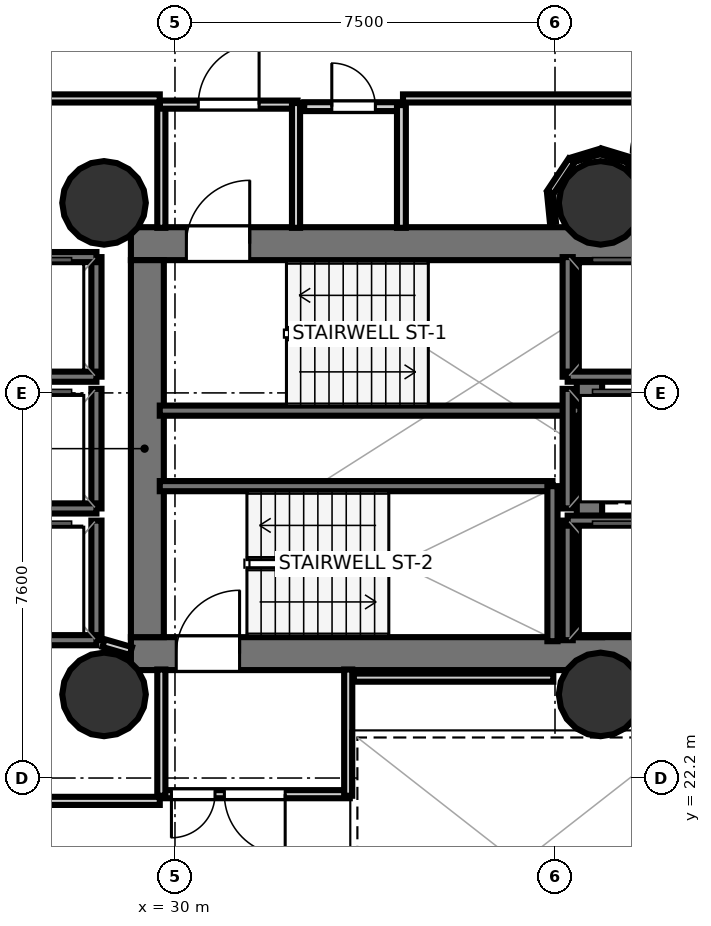
"""IFC4 building model, lengths in metres.
Left out: names, types, materials, properties, quantities, classifications, styles, units other than length and angle.
Written with IfcOpenShell. Run it as: python <this file> out.ifc"""

import sys

from ifc_helpers import new_model, si_unit, direction, frame, frame_2d, origin, origin_2d, place, context, subcontext, project, spatial, rectangle, hollow_circle, extrude, element, fill, save


model = new_model("IFC4")
c1 = context("Model", 3, precision=1e-05, world=origin(), true_north=direction((0.0, 1.0)))
c2 = subcontext(c1, "Body", "Model", "MODEL_VIEW")
j1 = project(units=[si_unit("LENGTHUNIT", "METRE"), si_unit("PLANEANGLEUNIT", "RADIAN")], contexts=[c1])
p1 = place(None, origin())
s1 = spatial("IfcSite", under=j1, at=p1, CompositionType="ELEMENT")
p2 = place(p1, origin())
s2 = spatial("IfcBuilding", under=s1, at=p2, CompositionType="ELEMENT")
p3 = place(p2, frame((0.0, 0.0, 82.1)))
s3 = spatial("IfcBuildingStorey", under=s2, at=p3, CompositionType="ELEMENT", Elevation=82.1)
p4 = place(p3, frame((29.13, 32.745, 0.0), z_axis=(0.0, 0.0, 1.0), x_axis=(1.0, 0.0, 0.0)))
e1 = element("IfcWall", 1, at=p4, inside=s3, PredefinedType="SHEAR", context=c2, shape_type="SweptSolid", body=[
    extrude(rectangle(XDim=10.72, YDim=0.65, at=frame_2d((5.36, 0.0))), origin(), (0.0, 0.0, 1.0), 3.52),
])
p5 = place(p4, frame((1.095, 0.0, 0.0)))
e2 = element("IfcOpeningElement", 2, at=p5, cuts=e1, PredefinedType="OPENING", context=c2, shape_type="SweptSolid", body=[
    extrude(rectangle(XDim=1.25, YDim=2.15, at=frame_2d((0.625, 1.075))), frame((0.0, 0.335, 0.0), z_axis=(0.0, -1.0, 0.0), x_axis=(1.0, 0.0, 0.0)), (0.0, 0.0, 1.0), 0.67),
])
p6 = place(p3, frame((29.13, 24.655, 0.0), z_axis=(0.0, 0.0, 1.0), x_axis=(1.0, 0.0, 0.0)))
e3 = element("IfcWall", 3, at=p6, inside=s3, PredefinedType="SHEAR", context=c2, shape_type="SweptSolid", body=[
    extrude(rectangle(XDim=10.72, YDim=0.65, at=frame_2d((5.36, 0.0))), origin(), (0.0, 0.0, 1.0), 3.52),
])
p7 = place(p6, frame((0.895, 0.0, 0.0)))
e4 = element("IfcOpeningElement", 4, at=p7, cuts=e3, PredefinedType="OPENING", context=c2, shape_type="SweptSolid", body=[
    extrude(rectangle(XDim=1.25, YDim=2.15, at=frame_2d((0.625, 1.075))), frame((0.0, 0.335, 0.0), z_axis=(0.0, -1.0, 0.0), x_axis=(1.0, 0.0, 0.0)), (0.0, 0.0, 1.0), 0.67),
])
p8 = place(p3, frame((29.455, 24.98, 0.0), z_axis=(0.0, 0.0, 1.0), x_axis=(0.0, 1.0, 0.0)))
e5 = element("IfcWall", 5, at=p8, inside=s3, PredefinedType="SHEAR", context=c2, shape_type="SweptSolid", body=[
    extrude(rectangle(XDim=7.44, YDim=0.65, at=frame_2d((3.72, 0.0))), origin(), (0.0, 0.0, 1.0), 3.52),
])
p9 = place(p3, frame((38.18, 24.98, 0.0), z_axis=(0.0, 0.0, 1.0), x_axis=(0.0, 1.0, 0.0)))
e6 = element("IfcWall", 6, at=p9, inside=s3, PredefinedType="SHEAR", context=c2, shape_type="SweptSolid", body=[
    extrude(rectangle(XDim=7.44, YDim=0.5, at=frame_2d((3.72, 0.0))), origin(), (0.0, 0.0, 1.0), 3.52),
])
for number, where, z_axis, x_axis in (
    (7, (28.6, 33.55, 0.0), (0.0, 0.0, 1.0), (1.0, 0.0, 0.0)),
    (8, (28.6, 23.85, 0.0), (0.0, 0.0, 1.0), (1.0, 0.0, 0.0)),
    (9, (38.4, 33.55, 0.0), (0.0, 0.0, 1.0), (1.0, 0.0, 0.0)),
    (10, (38.4, 23.85, 0.0), (0.0, 0.0, 1.0), (1.0, 0.0, 0.0)),
):
    element("IfcColumn", number, at=place(p3, frame(where, z_axis=z_axis, x_axis=x_axis)), inside=s3, PredefinedType="COLUMN", context=c2, shape_type="SweptSolid", body=[
        extrude(hollow_circle(Radius=0.825, WallThickness=0.04, at=origin_2d()), origin(), (0.0, 0.0, 1.0), 3.7),
    ])
p10 = place(p3, frame((29.7, 29.45, 0.0), z_axis=(0.0, 0.0, 1.0), x_axis=(1.0, 0.0, 0.0)))
e11 = element("IfcWall", 11, at=p10, inside=s3, PredefinedType="SOLIDWALL", context=c2, shape_type="SweptSolid", body=[
    extrude(rectangle(XDim=8.3, YDim=0.2, at=frame_2d((4.15, 0.0))), origin(), (0.0, 0.0, 1.0), 3.52),
])
p11 = place(p3, frame((29.7, 27.96, 0.0), z_axis=(0.0, 0.0, 1.0), x_axis=(1.0, 0.0, 0.0)))
e12 = element("IfcWall", 12, at=p11, inside=s3, PredefinedType="SOLIDWALL", context=c2, shape_type="SweptSolid", body=[
    extrude(rectangle(XDim=7.75, YDim=0.2, at=frame_2d((3.875, 0.0))), origin(), (0.0, 0.0, 1.0), 3.52),
])
p12 = place(p3, frame((37.45, 24.9, 0.0), z_axis=(0.0, 0.0, 1.0), x_axis=(0.0, 1.0, 0.0)))
e13 = element("IfcWall", 13, at=p12, inside=s3, PredefinedType="SOLIDWALL", context=c2, shape_type="SweptSolid", body=[
    extrude(rectangle(XDim=3.06, YDim=0.2, at=frame_2d((1.53, 0.0))), origin(), (0.0, 0.0, 1.0), 3.52),
])
p13 = place(p3, frame((37.75, 30.12, 0.0), z_axis=(0.0, 0.0, 1.0), x_axis=(0.0, 1.0, 0.0)))
e14 = element("IfcWall", 14, at=p13, inside=s3, PredefinedType="SOLIDWALL", context=c2, shape_type="SweptSolid", body=[
    extrude(rectangle(XDim=2.36, YDim=0.2, at=frame_2d((1.18, 0.0))), origin(), (0.0, 0.0, 1.0), 3.52),
])
p14 = place(p3, frame((37.75, 30.12, 0.0), z_axis=(0.0, 0.0, 1.0), x_axis=(1.0, 0.0, 0.0)))
e15 = element("IfcWall", 15, at=p14, inside=s3, PredefinedType="SOLIDWALL", context=c2, shape_type="SweptSolid", body=[
    extrude(rectangle(XDim=2.1, YDim=0.2, at=frame_2d((1.05, 0.0))), origin(), (0.0, 0.0, 1.0), 3.52),
])
p15 = place(p3, frame((37.75, 24.92, 0.0), z_axis=(0.0, 0.0, 1.0), x_axis=(0.0, 1.0, 0.0)))
e16 = element("IfcWall", 16, at=p15, inside=s3, PredefinedType="SOLIDWALL", context=c2, shape_type="SweptSolid", body=[
    extrude(rectangle(XDim=2.36, YDim=0.2, at=frame_2d((1.18, 0.0))), origin(), (0.0, 0.0, 1.0), 3.52),
])
p16 = place(p3, frame((37.75, 27.28, 0.0), z_axis=(0.0, 0.0, 1.0), x_axis=(1.0, 0.0, 0.0)))
e17 = element("IfcWall", 17, at=p16, inside=s3, PredefinedType="SOLIDWALL", context=c2, shape_type="SweptSolid", body=[
    extrude(rectangle(XDim=2.1, YDim=0.2, at=frame_2d((1.05, 0.0))), origin(), (0.0, 0.0, 1.0), 3.52),
])
p17 = place(p3, frame((28.45, 30.12, 0.0), z_axis=(0.0, 0.0, 1.0), x_axis=(0.0, 1.0, 0.0)))
e18 = element("IfcWall", 18, at=p17, inside=s3, PredefinedType="SOLIDWALL", context=c2, shape_type="SweptSolid", body=[
    extrude(rectangle(XDim=2.36, YDim=0.2, at=frame_2d((1.18, 0.0))), origin(), (0.0, 0.0, 1.0), 3.52),
])
for number, where, z_axis, x_axis in (
    (19, (26.35, 32.48, 0.0), (0.0, 0.0, 1.0), (1.0, 0.0, 0.0)),
    (20, (26.35, 30.12, 0.0), (0.0, 0.0, 1.0), (1.0, 0.0, 0.0)),
):
    element("IfcWall", number, at=place(p3, frame(where, z_axis=z_axis, x_axis=x_axis)), inside=s3, PredefinedType="SOLIDWALL", context=c2, shape_type="SweptSolid", body=[
        extrude(rectangle(XDim=2.1, YDim=0.2, at=frame_2d((1.05, 0.0))), origin(), (0.0, 0.0, 1.0), 3.52),
    ])
p18 = place(p3, frame((28.45, 27.52, 0.0), z_axis=(0.0, 0.0, 1.0), x_axis=(0.0, 1.0, 0.0)))
e21 = element("IfcWall", 21, at=p18, inside=s3, PredefinedType="SOLIDWALL", context=c2, shape_type="SweptSolid", body=[
    extrude(rectangle(XDim=2.36, YDim=0.2, at=frame_2d((1.18, 0.0))), origin(), (0.0, 0.0, 1.0), 3.52),
])
p19 = place(p3, frame((26.35, 27.52, 0.0), z_axis=(0.0, 0.0, 1.0), x_axis=(1.0, 0.0, 0.0)))
e22 = element("IfcWall", 22, at=p19, inside=s3, PredefinedType="SOLIDWALL", context=c2, shape_type="SweptSolid", body=[
    extrude(rectangle(XDim=2.1, YDim=0.2, at=frame_2d((1.05, 0.0))), origin(), (0.0, 0.0, 1.0), 3.52),
])
p20 = place(p3, frame((28.45, 24.92, 0.0), z_axis=(0.0, 0.0, 1.0), x_axis=(0.0, 1.0, 0.0)))
e23 = element("IfcWall", 23, at=p20, inside=s3, PredefinedType="SOLIDWALL", context=c2, shape_type="SweptSolid", body=[
    extrude(rectangle(XDim=2.36, YDim=0.2, at=frame_2d((1.18, 0.0))), origin(), (0.0, 0.0, 1.0), 3.52),
])
p21 = place(p3, frame((26.35, 24.92, 0.0), z_axis=(0.0, 0.0, 1.0), x_axis=(1.0, 0.0, 0.0)))
e24 = element("IfcWall", 24, at=p21, inside=s3, PredefinedType="SOLIDWALL", context=c2, shape_type="SweptSolid", body=[
    extrude(rectangle(XDim=2.1, YDim=0.2, at=frame_2d((1.05, 0.0))), origin(), (0.0, 0.0, 1.0), 3.52),
])
p22 = place(p3, frame((37.75, 27.52, 0.0), z_axis=(0.0, 0.0, 1.0), x_axis=(0.0, 1.0, 0.0)))
e25 = element("IfcWall", 25, at=p22, inside=s3, PredefinedType="SOLIDWALL", context=c2, shape_type="SweptSolid", body=[
    extrude(rectangle(XDim=2.36, YDim=0.2, at=frame_2d((1.18, 0.0))), origin(), (0.0, 0.0, 1.0), 3.52),
])
p23 = place(p3, frame((29.731, 33.058, 0.0), z_axis=(0.0, 0.0, 1.0), x_axis=(0.0, 1.0, 0.0)))
e26 = element("IfcWall", 26, at=p23, inside=s3, PredefinedType="PARTITIONING", context=c2, shape_type="SweptSolid", body=[
    extrude(rectangle(XDim=2.462, YDim=0.16, at=frame_2d((1.231, 0.0))), origin(), (0.0, 0.0, 1.0), 2.84),
])
p24 = place(p3, frame((29.7, 35.489, 0.0), z_axis=(0.0, 0.0, 1.0), x_axis=(1.0, 0.0, 0.0)))
e27 = element("IfcWall", 27, at=p24, inside=s3, PredefinedType="PARTITIONING", context=c2, shape_type="SweptSolid", body=[
    extrude(rectangle(XDim=2.72, YDim=0.16, at=frame_2d((1.36, 0.0))), origin(), (0.0, 0.0, 1.0), 2.84),
])
p25 = place(p24, frame((0.76, 0.0, 0.0)))
e28 = element("IfcOpeningElement", 28, at=p25, cuts=e27, PredefinedType="OPENING", context=c2, shape_type="SweptSolid", body=[
    extrude(rectangle(XDim=1.2, YDim=2.15, at=frame_2d((0.6, 1.075))), frame((0.0, 0.09, 0.0), z_axis=(0.0, -1.0, 0.0), x_axis=(1.0, 0.0, 0.0)), (0.0, 0.0, 1.0), 0.18),
])
p26 = place(p3, frame((32.389, 35.52, 0.0), z_axis=(0.0, 0.0, 1.0), x_axis=(0.0, -1.0, 0.0)))
e29 = element("IfcWall", 29, at=p26, inside=s3, PredefinedType="PARTITIONING", context=c2, shape_type="SweptSolid", body=[
    extrude(rectangle(XDim=2.462, YDim=0.16, at=frame_2d((1.231, 0.0))), origin(), (0.0, 0.0, 1.0), 2.84),
])
p27 = place(p3, frame((33.45, 21.881, 0.0), z_axis=(0.0, 0.0, 1.0), x_axis=(-1.0, 0.0, 0.0)))
e30 = element("IfcWall", 30, at=p27, inside=s3, PredefinedType="PARTITIONING", context=c2, shape_type="SweptSolid", body=[
    extrude(rectangle(XDim=3.75, YDim=0.16, at=frame_2d((1.875, 0.0))), origin(), (0.0, 0.0, 1.0), 2.84),
])
p28 = place(p27, frame((1.275, 0.0, 0.0)))
e31 = element("IfcOpeningElement", 31, at=p28, cuts=e30, PredefinedType="OPENING", context=c2, shape_type="SweptSolid", body=[
    extrude(rectangle(XDim=1.2, YDim=2.15, at=frame_2d((0.6, 1.075))), frame((0.0, 0.09, 0.0), z_axis=(0.0, -1.0, 0.0), x_axis=(1.0, 0.0, 0.0)), (0.0, 0.0, 1.0), 0.18),
])
p29 = place(p27, frame((2.66, 0.0, 0.0)))
e32 = element("IfcOpeningElement", 32, at=p29, cuts=e30, PredefinedType="OPENING", context=c2, shape_type="SweptSolid", body=[
    extrude(rectangle(XDim=0.86, YDim=2.05, at=frame_2d((0.43, 1.025))), frame((0.0, 0.09, 0.0), z_axis=(0.0, -1.0, 0.0), x_axis=(1.0, 0.0, 0.0)), (0.0, 0.0, 1.0), 0.18),
])
for number, where, z_axis, x_axis in (
    (33, (29.731, 21.85, 0.0), (0.0, 0.0, 1.0), (0.0, 1.0, 0.0)),
    (34, (33.419, 24.342, 0.0), (0.0, 0.0, 1.0), (0.0, -1.0, 0.0)),
):
    element("IfcWall", number, at=place(p3, frame(where, z_axis=z_axis, x_axis=x_axis)), inside=s3, PredefinedType="PARTITIONING", context=c2, shape_type="SweptSolid", body=[
        extrude(rectangle(XDim=2.492, YDim=0.16, at=frame_2d((1.246, 0.0))), origin(), (0.0, 0.0, 1.0), 2.84),
    ])
p30 = place(p3, frame((32.55, 35.449, 0.0), z_axis=(0.0, 0.0, 1.0), x_axis=(1.0, 0.0, 0.0)))
e35 = element("IfcWall", 35, at=p30, inside=s3, PredefinedType="PLUMBINGWALL", context=c2, shape_type="SweptSolid", body=[
    extrude(rectangle(XDim=1.95, YDim=0.175, at=frame_2d((0.975, 0.0))), origin(), (0.0, 0.0, 1.0), 2.84),
])
p31 = place(p30, frame((0.545, 0.0, 0.0)))
e36 = element("IfcOpeningElement", 36, at=p31, cuts=e35, PredefinedType="OPENING", context=c2, shape_type="SweptSolid", body=[
    extrude(rectangle(XDim=0.86, YDim=2.05, at=frame_2d((0.43, 1.025))), frame((0.0, 0.097, 0.0), z_axis=(0.0, -1.0, 0.0), x_axis=(1.0, 0.0, 0.0)), (0.0, 0.0, 1.0), 0.195),
])
p32 = place(p3, frame((34.469, 35.48, 0.0), z_axis=(0.0, 0.0, 1.0), x_axis=(0.0, -1.0, 0.0)))
e37 = element("IfcWall", 37, at=p32, inside=s3, PredefinedType="PLUMBINGWALL", context=c2, shape_type="SweptSolid", body=[
    extrude(rectangle(XDim=2.422, YDim=0.175, at=frame_2d((1.211, 0.0))), origin(), (0.0, 0.0, 1.0), 2.84),
])
p33 = place(p3, frame((29.13, 24.706, 0.0), z_axis=(0.0, 0.0, 1.0), x_axis=(-0.960451214223, 0.278448316742, 0.0)))
e38 = element("IfcWall", 38, at=p33, inside=s3, PredefinedType="PARTITIONING", context=c2, shape_type="SweptSolid", body=[
    extrude(rectangle(XDim=0.562, YDim=0.16, at=frame_2d((0.281, 0.0))), origin(), (0.0, 0.0, 1.0), 2.84),
])
p34 = place(p3, frame((37.467, 24.181, 0.0), z_axis=(0.0, 0.0, 1.0), x_axis=(-1.0, 0.0, 0.0)))
e39 = element("IfcWall", 39, at=p34, inside=s3, PredefinedType="PARTITIONING", context=c2, shape_type="SweptSolid", body=[
    extrude(rectangle(XDim=3.937, YDim=0.16, at=frame_2d((1.968, 0.0))), origin(), (0.0, 0.0, 1.0), 2.84),
])
p35 = place(p3, frame((39.818, 35.611, 0.0), z_axis=(0.0, 0.0, 1.0), x_axis=(-1.0, 0.0, 0.0)))
e40 = element("IfcWall", 40, at=p35, inside=s3, PredefinedType="PARTITIONING", context=c2, shape_type="SweptSolid", body=[
    extrude(rectangle(XDim=5.318, YDim=0.16, at=frame_2d((2.659, 0.0))), origin(), (0.0, 0.0, 1.0), 2.84),
])
p36 = place(p3, frame((29.7, 35.611, 0.0), z_axis=(0.0, 0.0, 1.0), x_axis=(-1.0, 0.0, 0.0)))
e41 = element("IfcWall", 41, at=p36, inside=s3, PredefinedType="PARTITIONING", context=c2, shape_type="SweptSolid", body=[
    extrude(rectangle(XDim=3.28, YDim=0.16, at=frame_2d((1.64, 0.0))), origin(), (0.0, 0.0, 1.0), 2.798),
])
p37 = place(p3, frame((26.42, 21.749, 0.0), z_axis=(0.0, 0.0, 1.0), x_axis=(1.0, 0.0, 0.0)))
e42 = element("IfcWall", 42, at=p37, inside=s3, PredefinedType="PARTITIONING", context=c2, shape_type="SweptSolid", body=[
    extrude(rectangle(XDim=3.28, YDim=0.16, at=frame_2d((1.64, 0.0))), origin(), (0.0, 0.0, 1.0), 2.84),
])
p38 = place(p3, frame((39.392, 33.76, 0.0), z_axis=(0.0, 0.0, 1.0), x_axis=(-0.555746078923, 0.831352088926, 0.0)))
e43 = element("IfcWall", 43, at=p38, inside=s3, PredefinedType="PARTITIONING", context=c2, shape_type="SweptSolid", body=[
    extrude(rectangle(XDim=0.754, YDim=0.14, at=frame_2d((0.377, 0.0))), origin(), (0.0, 0.0, 1.0), 2.84),
])
p39 = place(p3, frame((38.956, 34.399, 0.0), z_axis=(0.0, 0.0, 1.0), x_axis=(-0.956952578659, 0.290244314669, 0.0)))
e44 = element("IfcWall", 44, at=p39, inside=s3, PredefinedType="PARTITIONING", context=c2, shape_type="SweptSolid", body=[
    extrude(rectangle(XDim=0.572, YDim=0.12, at=frame_2d((0.286, 0.0))), origin(), (0.0, 0.0, 1.0), 2.84),
])
p40 = place(p3, frame((38.391, 34.565, 0.0), z_axis=(0.0, 0.0, 1.0), x_axis=(-0.956952578659, -0.290244314669, 0.0)))
e45 = element("IfcWall", 45, at=p40, inside=s3, PredefinedType="PARTITIONING", context=c2, shape_type="SweptSolid", body=[
    extrude(rectangle(XDim=0.572, YDim=0.105, at=frame_2d((0.286, 0.0))), origin(), (0.0, 0.0, 1.0), 2.84),
])
p41 = place(p3, frame((37.827, 34.386, 0.0), z_axis=(0.0, 0.0, 1.0), x_axis=(-0.555522182913, -0.831501716349, 0.0)))
e46 = element("IfcWall", 46, at=p41, inside=s3, PredefinedType="PARTITIONING", context=c2, shape_type="SweptSolid", body=[
    extrude(rectangle(XDim=0.754, YDim=0.14, at=frame_2d((0.377, 0.0))), origin(), (0.0, 0.0, 1.0), 2.84),
])
p42 = place(p3, frame((37.403, 33.739, 0.0), z_axis=(0.0, 0.0, 1.0), x_axis=(0.097770424665, -0.995208995167, 0.0)))
e47 = element("IfcWall", 47, at=p42, inside=s3, PredefinedType="PARTITIONING", context=c2, shape_type="SweptSolid", body=[
    extrude(rectangle(XDim=0.572, YDim=0.12, at=frame_2d((0.286, 0.0))), origin(), (0.0, 0.0, 1.0), 2.84),
])
p43 = place(p5, origin())
e48 = element("IfcDoor", 48, at=p43, inside=s3, OperationType="SINGLE_SWING_RIGHT", PredefinedType="DOOR", context=c2, shape_type="SweptSolid", body=[
    extrude(rectangle(XDim=1.25, YDim=2.15, at=frame_2d((0.625, 1.075))), frame((0.0, 0.025, 0.0), z_axis=(0.0, -1.0, 0.0), x_axis=(1.0, 0.0, 0.0)), (0.0, 0.0, 1.0), 0.05),
])
fill(e2, e48)
p44 = place(p7, origin())
e49 = element("IfcDoor", 49, at=p44, inside=s3, OperationType="SINGLE_SWING_RIGHT", PredefinedType="DOOR", context=c2, shape_type="SweptSolid", body=[
    extrude(rectangle(XDim=1.25, YDim=2.15, at=frame_2d((0.625, 1.075))), frame((0.0, 0.025, 0.0), z_axis=(0.0, -1.0, 0.0), x_axis=(1.0, 0.0, 0.0)), (0.0, 0.0, 1.0), 0.05),
])
fill(e4, e49)
p45 = place(p25, origin())
e50 = element("IfcDoor", 50, at=p45, inside=s3, OperationType="SINGLE_SWING_RIGHT", PredefinedType="DOOR", context=c2, shape_type="SweptSolid", body=[
    extrude(rectangle(XDim=1.2, YDim=2.15, at=frame_2d((0.6, 1.075))), frame((0.0, 0.025, 0.0), z_axis=(0.0, -1.0, 0.0), x_axis=(1.0, 0.0, 0.0)), (0.0, 0.0, 1.0), 0.05),
])
fill(e28, e50)
p46 = place(p28, origin())
e51 = element("IfcDoor", 51, at=p46, inside=s3, OperationType="SINGLE_SWING_LEFT", PredefinedType="DOOR", context=c2, shape_type="SweptSolid", body=[
    extrude(rectangle(XDim=1.2, YDim=2.15, at=frame_2d((0.6, 1.075))), frame((0.0, 0.025, 0.0), z_axis=(0.0, -1.0, 0.0), x_axis=(1.0, 0.0, 0.0)), (0.0, 0.0, 1.0), 0.05),
])
fill(e31, e51)
p47 = place(p31, origin())
e52 = element("IfcDoor", 52, at=p47, inside=s3, OperationType="SINGLE_SWING_LEFT", PredefinedType="DOOR", context=c2, shape_type="SweptSolid", body=[
    extrude(rectangle(XDim=0.86, YDim=2.05, at=frame_2d((0.43, 1.025))), frame((0.0, 0.025, 0.0), z_axis=(0.0, -1.0, 0.0), x_axis=(1.0, 0.0, 0.0)), (0.0, 0.0, 1.0), 0.05),
])
fill(e36, e52)
p48 = place(p29, origin())
e53 = element("IfcDoor", 53, at=p48, inside=s3, OperationType="SINGLE_SWING_RIGHT", PredefinedType="DOOR", context=c2, shape_type="SweptSolid", body=[
    extrude(rectangle(XDim=0.86, YDim=2.05, at=frame_2d((0.43, 1.025))), frame((0.0, 0.025, 0.0), z_axis=(0.0, -1.0, 0.0), x_axis=(1.0, 0.0, 0.0)), (0.0, 0.0, 1.0), 0.05),
])
fill(e32, e53)
save(model, sys.argv[1])
